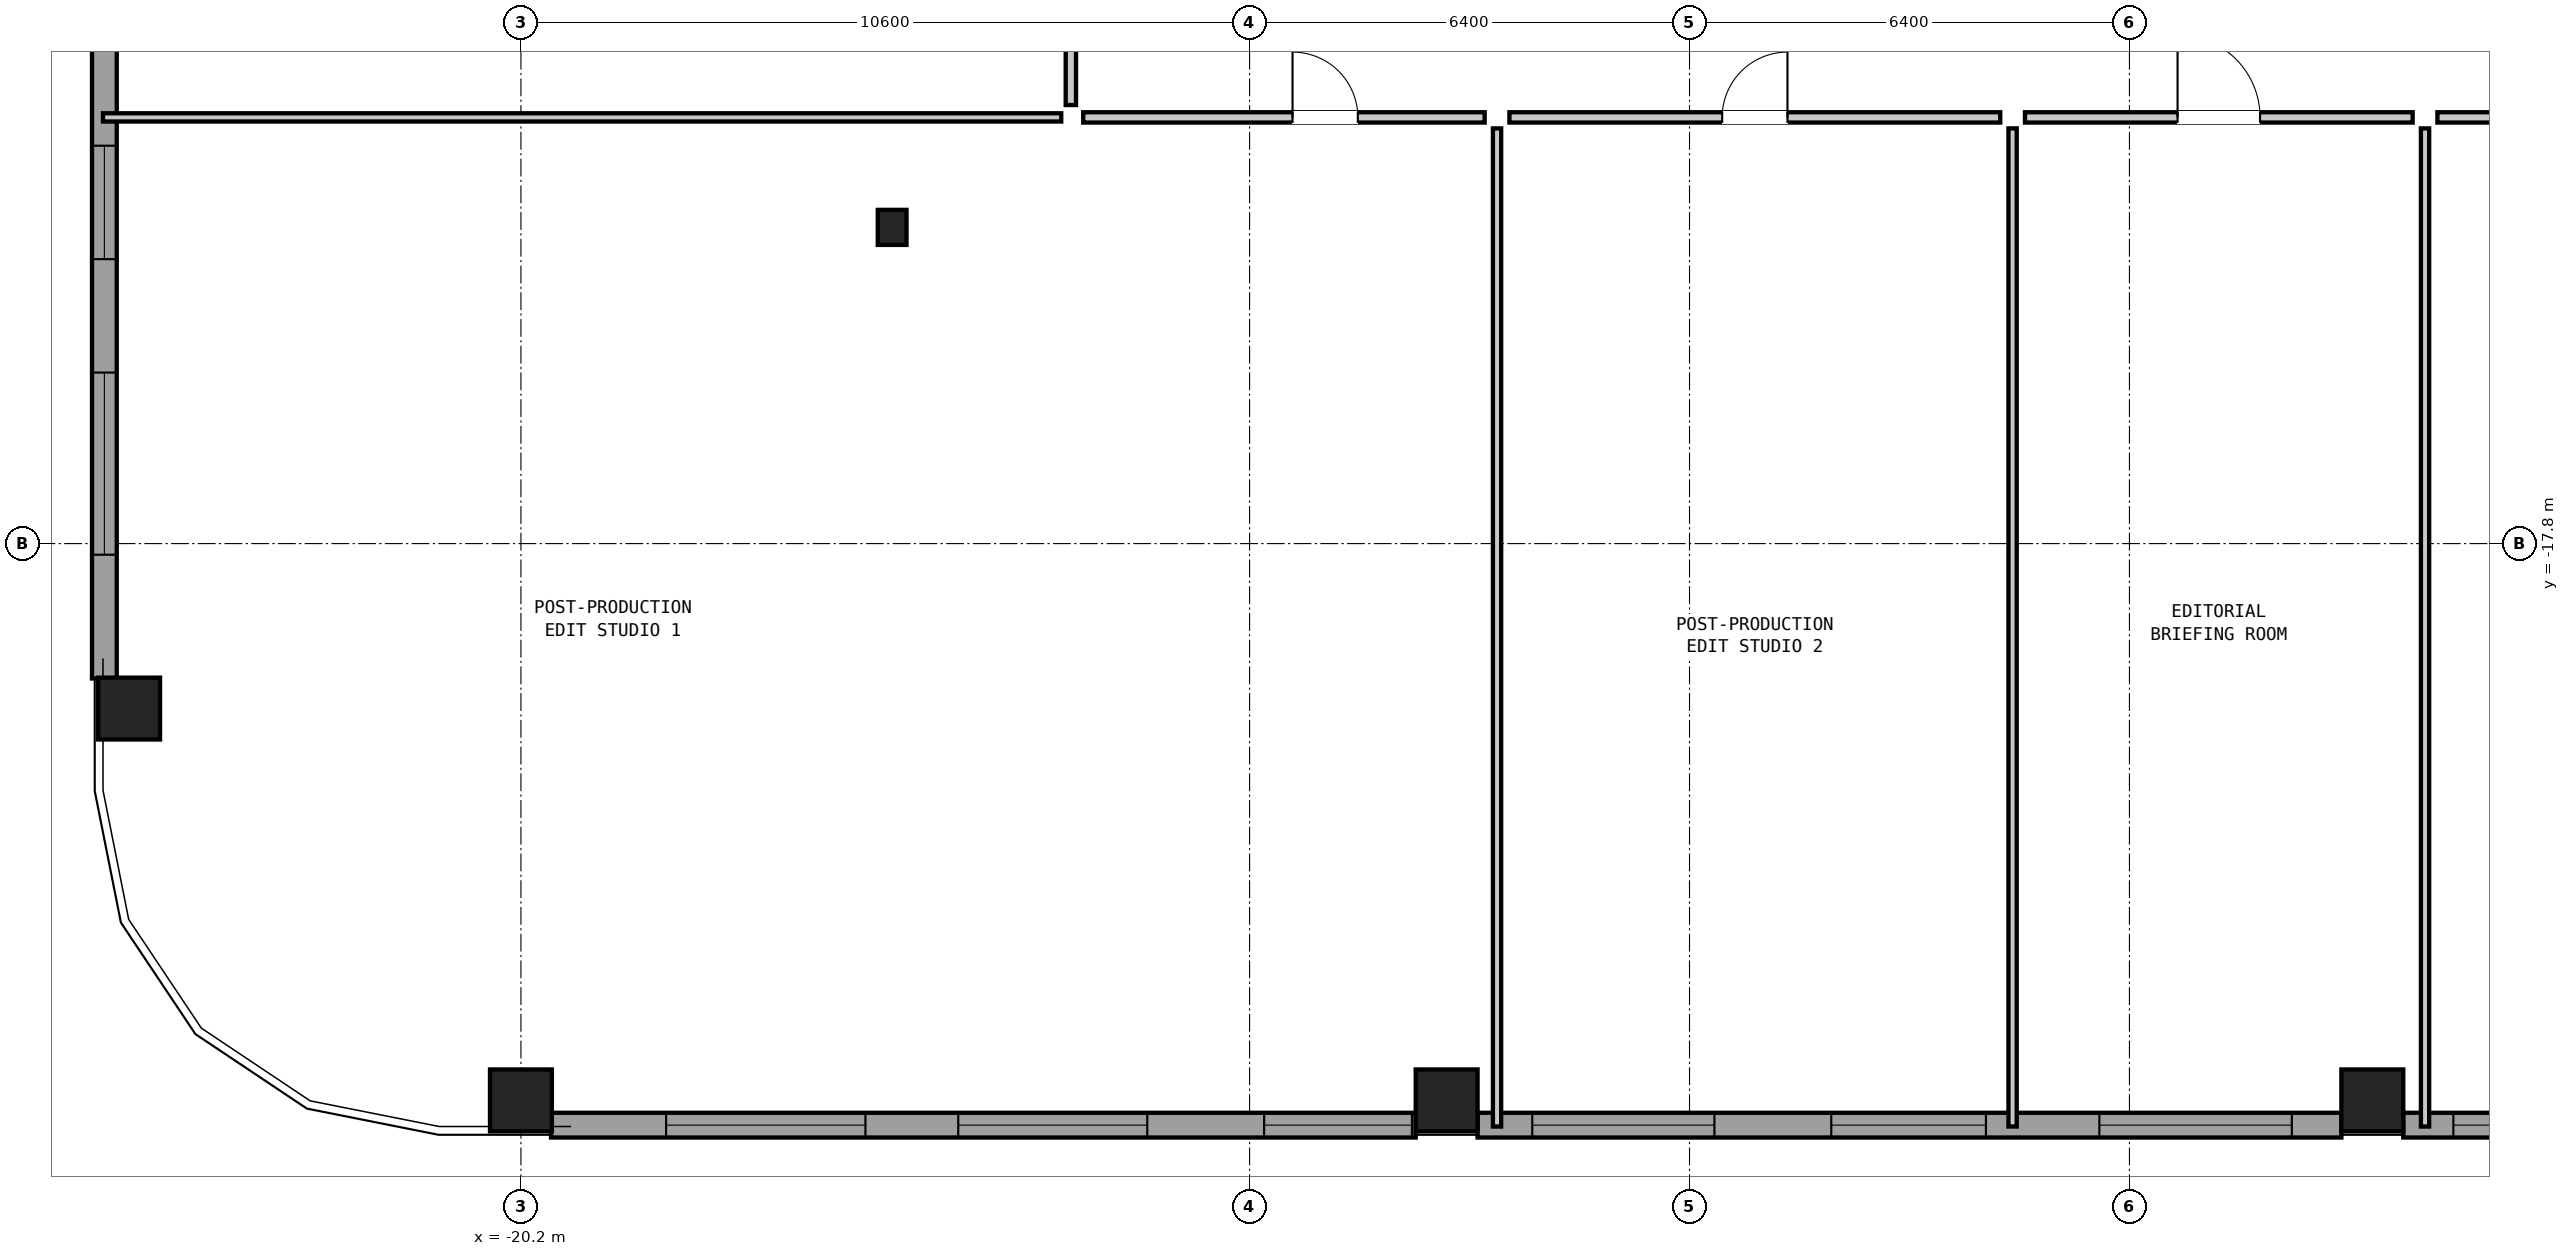
"""IFC4 building model, lengths in metres.
Left out: names, types, materials, properties, quantities, classifications, styles, units other than length and angle.
Written with IfcOpenShell. Run it as: python <this file> out.ifc"""

import sys

from ifc_helpers import new_model, si_unit, direction, frame, frame_2d, origin, origin_2d, place, context, subcontext, project, spatial, rectangle, hollow_rectangle, i_section, extrude, element, fill, save


model = new_model("IFC4")
c1 = context("Model", 3, precision=1e-05, world=origin(), true_north=direction((0.0, 1.0)))
c2 = subcontext(c1, "Body", "Model", "MODEL_VIEW")
j1 = project(units=[si_unit("LENGTHUNIT", "METRE"), si_unit("PLANEANGLEUNIT", "RADIAN")], contexts=[c1])
p1 = place(None, origin())
s1 = spatial("IfcSite", under=j1, at=p1, CompositionType="ELEMENT")
p2 = place(p1, origin())
s2 = spatial("IfcBuilding", under=s1, at=p2, CompositionType="ELEMENT")
p3 = place(p2, frame((0.0, 0.0, 47.45)))
s3 = spatial("IfcBuildingStorey", under=s2, at=p3, CompositionType="ELEMENT", Elevation=47.45)
for number, where, z_axis, x_axis in (
    (1, (-20.2, -25.9, 0.0), (0.0, 0.0, 1.0), (1.0, 0.0, 0.0)),
    (2, (-6.733, -25.9, 0.0), (0.0, 0.0, 1.0), (1.0, 0.0, 0.0)),
    (3, (6.733, -25.9, 0.0), (0.0, 0.0, 1.0), (1.0, 0.0, 0.0)),
    (4, (-25.9, -20.2, 0.0), (0.0, 0.0, 1.0), (0.0, 1.0, 0.0)),
):
    element("IfcColumn", number, at=place(p3, frame(where, z_axis=z_axis, x_axis=x_axis)), inside=s3, PredefinedType="COLUMN", context=c2, shape_type="SweptSolid", body=[
        extrude(hollow_rectangle(XDim=0.9, YDim=0.9, WallThickness=0.055, at=origin_2d()), origin(), (0.0, 0.0, 1.0), 3.05),
    ])
p4 = place(p3, frame((-14.8, -13.2, 0.0), z_axis=(0.0, 0.0, 1.0), x_axis=(1.0, 0.0, 0.0)))
e5 = element("IfcColumn", 5, at=p4, inside=s3, PredefinedType="COLUMN", context=c2, shape_type="SweptSolid", body=[
    extrude(i_section(OverallWidth=0.418, OverallDepth=0.51, WebThickness=0.042, FlangeThickness=0.068, at=origin_2d()), origin(), (0.0, 0.0, 1.0), 3.05),
])
p5 = place(p3, frame((19.762, -26.26, 0.0), z_axis=(0.0, 0.0, 1.0), x_axis=(-1.0, 0.0, 0.0)))
e6 = element("IfcWall", 6, at=p5, inside=s3, PredefinedType="SOLIDWALL", context=c2, shape_type="SweptSolid", body=[
    extrude(rectangle(XDim=12.579, YDim=0.36, at=frame_2d((6.289, 0.0))), origin(), (0.0, 0.0, 1.0), 2.067),
])
p6 = place(p5, frame((1.75, 0.0, 0.2)))
e7 = element("IfcOpeningElement", 7, at=p6, cuts=e6, PredefinedType="OPENING", context=c2, shape_type="SweptSolid", body=[
    extrude(rectangle(XDim=2.75, YDim=0.95, at=frame_2d((1.375, 0.475))), frame((0.0, 0.192, 0.0), z_axis=(0.0, -1.0, 0.0), x_axis=(1.0, 0.0, 0.0)), (0.0, 0.0, 1.0), 0.384),
])
p7 = place(p5, frame((5.9, 0.0, 0.95)))
e8 = element("IfcOpeningElement", 8, at=p7, cuts=e6, PredefinedType="OPENING", context=c2, shape_type="SweptSolid", body=[
    extrude(rectangle(XDim=2.75, YDim=0.95, at=frame_2d((1.375, 0.475))), frame((0.0, 0.192, 0.0), z_axis=(0.0, -1.0, 0.0), x_axis=(1.0, 0.0, 0.0)), (0.0, 0.0, 1.0), 0.384),
])
p8 = place(p5, frame((10.3, 0.0, 0.2)))
e9 = element("IfcOpeningElement", 9, at=p8, cuts=e6, PredefinedType="OPENING", context=c2, shape_type="SweptSolid", body=[
    extrude(rectangle(XDim=1.55, YDim=1.1, at=frame_2d((0.775, 0.55))), frame((0.0, 0.192, 0.0), z_axis=(0.0, -1.0, 0.0), x_axis=(1.0, 0.0, 0.0)), (0.0, 0.0, 1.0), 0.384),
])
p9 = place(p3, frame((6.283, -26.26, 0.0), z_axis=(0.0, 0.0, 1.0), x_axis=(-1.0, 0.0, 0.0)))
e10 = element("IfcWall", 10, at=p9, inside=s3, PredefinedType="SOLIDWALL", context=c2, shape_type="SweptSolid", body=[
    extrude(rectangle(XDim=12.566, YDim=0.36, at=frame_2d((6.283, 0.0))), origin(), (0.0, 0.0, 1.0), 2.067),
])
p10 = place(p9, frame((0.721, 0.0, 0.95)))
e11 = element("IfcOpeningElement", 11, at=p10, cuts=e10, PredefinedType="OPENING", context=c2, shape_type="SweptSolid", body=[
    extrude(rectangle(XDim=2.8, YDim=0.95, at=frame_2d((1.4, 0.475))), frame((0.0, 0.192, 0.0), z_axis=(0.0, -1.0, 0.0), x_axis=(1.0, 0.0, 0.0)), (0.0, 0.0, 1.0), 0.384),
])
p11 = place(p9, frame((5.171, 0.0, 0.2)))
e12 = element("IfcOpeningElement", 12, at=p11, cuts=e10, PredefinedType="OPENING", context=c2, shape_type="SweptSolid", body=[
    extrude(rectangle(XDim=2.25, YDim=1.1, at=frame_2d((1.125, 0.55))), frame((0.0, 0.192, 0.0), z_axis=(0.0, -1.0, 0.0), x_axis=(1.0, 0.0, 0.0)), (0.0, 0.0, 1.0), 0.384),
])
p12 = place(p9, frame((9.121, 0.0, 0.9)))
e13 = element("IfcOpeningElement", 13, at=p12, cuts=e10, PredefinedType="OPENING", context=c2, shape_type="SweptSolid", body=[
    extrude(rectangle(XDim=2.65, YDim=1.0, at=frame_2d((1.325, 0.5))), frame((0.0, 0.192, 0.0), z_axis=(0.0, -1.0, 0.0), x_axis=(1.0, 0.0, 0.0)), (0.0, 0.0, 1.0), 0.384),
])
p13 = place(p3, frame((-7.183, -26.26, 0.0), z_axis=(0.0, 0.0, 1.0), x_axis=(-1.0, 0.0, 0.0)))
e14 = element("IfcWall", 14, at=p13, inside=s3, PredefinedType="SOLIDWALL", context=c2, shape_type="SweptSolid", body=[
    extrude(rectangle(XDim=12.579, YDim=0.36, at=frame_2d((6.289, 0.0))), origin(), (0.0, 0.0, 1.0), 2.067),
])
p14 = place(p13, frame((0.055, 0.0, 0.2)))
e15 = element("IfcOpeningElement", 15, at=p14, cuts=e14, PredefinedType="OPENING", context=c2, shape_type="SweptSolid", body=[
    extrude(rectangle(XDim=2.15, YDim=1.15, at=frame_2d((1.075, 0.575))), frame((0.0, 0.192, 0.0), z_axis=(0.0, -1.0, 0.0), x_axis=(1.0, 0.0, 0.0)), (0.0, 0.0, 1.0), 0.384),
])
p15 = place(p13, frame((3.905, 0.0, 0.95)))
e16 = element("IfcOpeningElement", 16, at=p15, cuts=e14, PredefinedType="OPENING", context=c2, shape_type="SweptSolid", body=[
    extrude(rectangle(XDim=2.75, YDim=0.95, at=frame_2d((1.375, 0.475))), frame((0.0, 0.192, 0.0), z_axis=(0.0, -1.0, 0.0), x_axis=(1.0, 0.0, 0.0)), (0.0, 0.0, 1.0), 0.384),
])
p16 = place(p13, frame((8.005, 0.0, 0.2)))
e17 = element("IfcOpeningElement", 17, at=p16, cuts=e14, PredefinedType="OPENING", context=c2, shape_type="SweptSolid", body=[
    extrude(rectangle(XDim=2.9, YDim=0.9, at=frame_2d((1.45, 0.45))), frame((0.0, 0.192, 0.0), z_axis=(0.0, -1.0, 0.0), x_axis=(1.0, 0.0, 0.0)), (0.0, 0.0, 1.0), 0.384),
])
p17 = place(p3, frame((-26.26, -19.762, 0.0), z_axis=(0.0, 0.0, 1.0), x_axis=(0.0, 1.0, 0.0)))
e18 = element("IfcWall", 18, at=p17, inside=s3, PredefinedType="SOLIDWALL", context=c2, shape_type="SweptSolid", body=[
    extrude(rectangle(XDim=12.579, YDim=0.36, at=frame_2d((6.289, 0.0))), origin(), (0.0, 0.0, 1.0), 2.067),
])
p18 = place(p17, frame((1.8, 0.0, 0.2)))
e19 = element("IfcOpeningElement", 19, at=p18, cuts=e18, PredefinedType="OPENING", context=c2, shape_type="SweptSolid", body=[
    extrude(rectangle(XDim=2.65, YDim=1.05, at=frame_2d((1.325, 0.525))), frame((0.0, 0.192, 0.0), z_axis=(0.0, -1.0, 0.0), x_axis=(1.0, 0.0, 0.0)), (0.0, 0.0, 1.0), 0.384),
])
p19 = place(p17, frame((6.1, 0.0, 0.75)))
e20 = element("IfcOpeningElement", 20, at=p19, cuts=e18, PredefinedType="OPENING", context=c2, shape_type="SweptSolid", body=[
    extrude(rectangle(XDim=1.65, YDim=1.15, at=frame_2d((0.825, 0.575))), frame((0.0, 0.192, 0.0), z_axis=(0.0, -1.0, 0.0), x_axis=(1.0, 0.0, 0.0)), (0.0, 0.0, 1.0), 0.384),
])
p20 = place(p17, frame((10.35, 0.0, 0.2)))
e21 = element("IfcOpeningElement", 21, at=p20, cuts=e18, PredefinedType="OPENING", context=c2, shape_type="SweptSolid", body=[
    extrude(rectangle(XDim=2.15, YDim=1.2, at=frame_2d((1.075, 0.6))), frame((0.0, 0.192, 0.0), z_axis=(0.0, -1.0, 0.0), x_axis=(1.0, 0.0, 0.0)), (0.0, 0.0, 1.0), 0.384),
])
p21 = place(p3, frame((-26.28, -11.6, 0.0), z_axis=(0.0, 0.0, 1.0), x_axis=(1.0, 0.0, 0.0)))
e22 = element("IfcWall", 22, at=p21, inside=s3, PredefinedType="PARTITIONING", context=c2, shape_type="SweptSolid", body=[
    extrude(rectangle(XDim=13.94, YDim=0.12, at=frame_2d((6.97, 0.0))), origin(), (0.0, 0.0, 1.0), 2.274),
])
p22 = place(p3, frame((-6.0, -26.28, 0.0), z_axis=(0.0, 0.0, 1.0), x_axis=(0.0, 1.0, 0.0)))
e23 = element("IfcWall", 23, at=p22, inside=s3, PredefinedType="PARTITIONING", context=c2, shape_type="SweptSolid", body=[
    extrude(rectangle(XDim=14.52, YDim=0.12, at=frame_2d((7.26, 0.0))), origin(), (0.0, 0.0, 1.0), 2.274),
])
for number, where, z_axis, x_axis in (
    (24, (1.5, -26.28, 0.0), (0.0, 0.0, 1.0), (0.0, 1.0, 0.0)),
    (25, (7.5, -26.28, 0.0), (0.0, 0.0, 1.0), (0.0, 1.0, 0.0)),
):
    element("IfcWall", number, at=place(p3, frame(where, z_axis=z_axis, x_axis=x_axis)), inside=s3, PredefinedType="PARTITIONING", context=c2, shape_type="SweptSolid", body=[
        extrude(rectangle(XDim=14.52, YDim=0.12, at=frame_2d((7.26, 0.0))), origin(), (0.0, 0.0, 1.0), 2.83),
    ])
p23 = place(p3, frame((-12.02, -11.6, 0.0), z_axis=(0.0, 0.0, 1.0), x_axis=(1.0, 0.0, 0.0)))
e26 = element("IfcWall", 26, at=p23, inside=s3, PredefinedType="PARTITIONING", context=c2, shape_type="SweptSolid", body=[
    extrude(rectangle(XDim=5.84, YDim=0.15, at=frame_2d((2.92, 0.0))), origin(), (0.0, 0.0, 1.0), 2.274),
])
p24 = place(p23, frame((3.045, 0.0, 0.0)))
e27 = element("IfcOpeningElement", 27, at=p24, cuts=e26, PredefinedType="OPENING", context=c2, shape_type="SweptSolid", body=[
    extrude(rectangle(XDim=0.95, YDim=2.1, at=frame_2d((0.475, 1.05))), frame((0.0, 0.087, 0.0), z_axis=(0.0, -1.0, 0.0), x_axis=(1.0, 0.0, 0.0)), (0.0, 0.0, 1.0), 0.174),
])
p25 = place(p3, frame((-5.82, -11.6, 0.0), z_axis=(0.0, 0.0, 1.0), x_axis=(1.0, 0.0, 0.0)))
e28 = element("IfcWall", 28, at=p25, inside=s3, PredefinedType="PARTITIONING", context=c2, shape_type="SweptSolid", body=[
    extrude(rectangle(XDim=7.14, YDim=0.15, at=frame_2d((3.57, 0.0))), origin(), (0.0, 0.0, 1.0), 2.83),
])
p26 = place(p25, frame((3.095, 0.0, 0.0)))
e29 = element("IfcOpeningElement", 29, at=p26, cuts=e28, PredefinedType="OPENING", context=c2, shape_type="SweptSolid", body=[
    extrude(rectangle(XDim=0.95, YDim=2.1, at=frame_2d((0.475, 1.05))), frame((0.0, 0.087, 0.0), z_axis=(0.0, -1.0, 0.0), x_axis=(1.0, 0.0, 0.0)), (0.0, 0.0, 1.0), 0.174),
])
p27 = place(p3, frame((1.68, -11.6, 0.0), z_axis=(0.0, 0.0, 1.0), x_axis=(1.0, 0.0, 0.0)))
e30 = element("IfcWall", 30, at=p27, inside=s3, PredefinedType="PARTITIONING", context=c2, shape_type="SweptSolid", body=[
    extrude(rectangle(XDim=5.64, YDim=0.15, at=frame_2d((2.82, 0.0))), origin(), (0.0, 0.0, 1.0), 2.83),
])
p28 = place(p27, frame((2.22, 0.0, 0.0)))
e31 = element("IfcOpeningElement", 31, at=p28, cuts=e30, PredefinedType="OPENING", context=c2, shape_type="SweptSolid", body=[
    extrude(rectangle(XDim=1.2, YDim=2.1, at=frame_2d((0.6, 1.05))), frame((0.0, 0.087, 0.0), z_axis=(0.0, -1.0, 0.0), x_axis=(1.0, 0.0, 0.0)), (0.0, 0.0, 1.0), 0.174),
])
p29 = place(p3, frame((7.68, -11.6, 0.0), z_axis=(0.0, 0.0, 1.0), x_axis=(1.0, 0.0, 0.0)))
e32 = element("IfcWall", 32, at=p29, inside=s3, PredefinedType="PARTITIONING", context=c2, shape_type="SweptSolid", body=[
    extrude(rectangle(XDim=4.34, YDim=0.15, at=frame_2d((2.17, 0.0))), origin(), (0.0, 0.0, 1.0), 2.274),
])
p30 = place(p29, frame((2.095, 0.0, 0.0)))
e33 = element("IfcOpeningElement", 33, at=p30, cuts=e32, PredefinedType="OPENING", context=c2, shape_type="SweptSolid", body=[
    extrude(rectangle(XDim=0.95, YDim=2.1, at=frame_2d((0.475, 1.05))), frame((0.0, 0.087, 0.0), z_axis=(0.0, -1.0, 0.0), x_axis=(1.0, 0.0, 0.0)), (0.0, 0.0, 1.0), 0.174),
])
p31 = place(p3, frame((-12.2, -11.42, 0.0), z_axis=(0.0, 0.0, 1.0), x_axis=(0.0, 1.0, 0.0)))
e34 = element("IfcWall", 34, at=p31, inside=s3, PredefinedType="PARTITIONING", context=c2, shape_type="SweptSolid", body=[
    extrude(rectangle(XDim=8.24, YDim=0.15, at=frame_2d((4.12, 0.0))), origin(), (0.0, 0.0, 1.0), 2.83),
])
p32 = place(p31, frame((3.645, 0.0, 0.0)))
e35 = element("IfcOpeningElement", 35, at=p32, cuts=e34, PredefinedType="OPENING", context=c2, shape_type="SweptSolid", body=[
    extrude(rectangle(XDim=0.95, YDim=2.1, at=frame_2d((0.475, 1.05))), frame((0.0, 0.087, 0.0), z_axis=(0.0, -1.0, 0.0), x_axis=(1.0, 0.0, 0.0)), (0.0, 0.0, 1.0), 0.174),
])
p33 = place(p8, origin())
e36 = element("IfcWindow", 36, at=p33, inside=s3, PartitioningType="SINGLE_PANEL", PredefinedType="WINDOW", context=c2, shape_type="SweptSolid", body=[
    extrude(rectangle(XDim=1.55, YDim=1.1, at=frame_2d((0.775, 0.55))), frame((0.0, 0.03, 0.0), z_axis=(0.0, -1.0, 0.0), x_axis=(1.0, 0.0, 0.0)), (0.0, 0.0, 1.0), 0.06),
])
fill(e9, e36)
p34 = place(p10, origin())
e37 = element("IfcWindow", 37, at=p34, inside=s3, PartitioningType="SINGLE_PANEL", PredefinedType="WINDOW", context=c2, shape_type="SweptSolid", body=[
    extrude(rectangle(XDim=2.8, YDim=0.95, at=frame_2d((1.4, 0.475))), frame((0.0, 0.03, 0.0), z_axis=(0.0, -1.0, 0.0), x_axis=(1.0, 0.0, 0.0)), (0.0, 0.0, 1.0), 0.06),
])
fill(e11, e37)
p35 = place(p11, origin())
e38 = element("IfcWindow", 38, at=p35, inside=s3, PartitioningType="SINGLE_PANEL", PredefinedType="WINDOW", context=c2, shape_type="SweptSolid", body=[
    extrude(rectangle(XDim=2.25, YDim=1.1, at=frame_2d((1.125, 0.55))), frame((0.0, 0.03, 0.0), z_axis=(0.0, -1.0, 0.0), x_axis=(1.0, 0.0, 0.0)), (0.0, 0.0, 1.0), 0.06),
])
fill(e12, e38)
p36 = place(p12, origin())
e39 = element("IfcWindow", 39, at=p36, inside=s3, PartitioningType="SINGLE_PANEL", PredefinedType="WINDOW", context=c2, shape_type="SweptSolid", body=[
    extrude(rectangle(XDim=2.65, YDim=1.0, at=frame_2d((1.325, 0.5))), frame((0.0, 0.03, 0.0), z_axis=(0.0, -1.0, 0.0), x_axis=(1.0, 0.0, 0.0)), (0.0, 0.0, 1.0), 0.06),
])
fill(e13, e39)
p37 = place(p14, origin())
e40 = element("IfcWindow", 40, at=p37, inside=s3, PartitioningType="SINGLE_PANEL", PredefinedType="WINDOW", context=c2, shape_type="SweptSolid", body=[
    extrude(rectangle(XDim=2.15, YDim=1.15, at=frame_2d((1.075, 0.575))), frame((0.0, 0.03, 0.0), z_axis=(0.0, -1.0, 0.0), x_axis=(1.0, 0.0, 0.0)), (0.0, 0.0, 1.0), 0.06),
])
fill(e15, e40)
p38 = place(p15, origin())
e41 = element("IfcWindow", 41, at=p38, inside=s3, PartitioningType="SINGLE_PANEL", PredefinedType="WINDOW", context=c2, shape_type="SweptSolid", body=[
    extrude(rectangle(XDim=2.75, YDim=0.95, at=frame_2d((1.375, 0.475))), frame((0.0, 0.03, 0.0), z_axis=(0.0, -1.0, 0.0), x_axis=(1.0, 0.0, 0.0)), (0.0, 0.0, 1.0), 0.06),
])
fill(e16, e41)
p39 = place(p16, origin())
e42 = element("IfcWindow", 42, at=p39, inside=s3, PartitioningType="SINGLE_PANEL", PredefinedType="WINDOW", context=c2, shape_type="SweptSolid", body=[
    extrude(rectangle(XDim=2.9, YDim=0.9, at=frame_2d((1.45, 0.45))), frame((0.0, 0.03, 0.0), z_axis=(0.0, -1.0, 0.0), x_axis=(1.0, 0.0, 0.0)), (0.0, 0.0, 1.0), 0.06),
])
fill(e17, e42)
p40 = place(p18, origin())
e43 = element("IfcWindow", 43, at=p40, inside=s3, PartitioningType="SINGLE_PANEL", PredefinedType="WINDOW", context=c2, shape_type="SweptSolid", body=[
    extrude(rectangle(XDim=2.65, YDim=1.05, at=frame_2d((1.325, 0.525))), frame((0.0, 0.03, 0.0), z_axis=(0.0, -1.0, 0.0), x_axis=(1.0, 0.0, 0.0)), (0.0, 0.0, 1.0), 0.06),
])
fill(e19, e43)
p41 = place(p19, origin())
e44 = element("IfcWindow", 44, at=p41, inside=s3, PartitioningType="SINGLE_PANEL", PredefinedType="WINDOW", context=c2, shape_type="SweptSolid", body=[
    extrude(rectangle(XDim=1.65, YDim=1.15, at=frame_2d((0.825, 0.575))), frame((0.0, 0.03, 0.0), z_axis=(0.0, -1.0, 0.0), x_axis=(1.0, 0.0, 0.0)), (0.0, 0.0, 1.0), 0.06),
])
fill(e20, e44)
p42 = place(p24, origin())
e45 = element("IfcDoor", 45, at=p42, inside=s3, OperationType="SINGLE_SWING_LEFT", PredefinedType="DOOR", context=c2, shape_type="SweptSolid", body=[
    extrude(rectangle(XDim=0.95, YDim=2.1, at=frame_2d((0.475, 1.05))), frame((0.0, 0.025, 0.0), z_axis=(0.0, -1.0, 0.0), x_axis=(1.0, 0.0, 0.0)), (0.0, 0.0, 1.0), 0.05),
])
fill(e27, e45)
p43 = place(p26, origin())
e46 = element("IfcDoor", 46, at=p43, inside=s3, OperationType="SINGLE_SWING_RIGHT", PredefinedType="DOOR", context=c2, shape_type="SweptSolid", body=[
    extrude(rectangle(XDim=0.95, YDim=2.1, at=frame_2d((0.475, 1.05))), frame((0.0, 0.025, 0.0), z_axis=(0.0, -1.0, 0.0), x_axis=(1.0, 0.0, 0.0)), (0.0, 0.0, 1.0), 0.05),
])
fill(e29, e46)
p44 = place(p28, origin())
e47 = element("IfcDoor", 47, at=p44, inside=s3, OperationType="SINGLE_SWING_LEFT", PredefinedType="DOOR", context=c2, shape_type="SweptSolid", body=[
    extrude(rectangle(XDim=1.2, YDim=2.1, at=frame_2d((0.6, 1.05))), frame((0.0, 0.025, 0.0), z_axis=(0.0, -1.0, 0.0), x_axis=(1.0, 0.0, 0.0)), (0.0, 0.0, 1.0), 0.05),
])
fill(e31, e47)
save(model, sys.argv[1])
